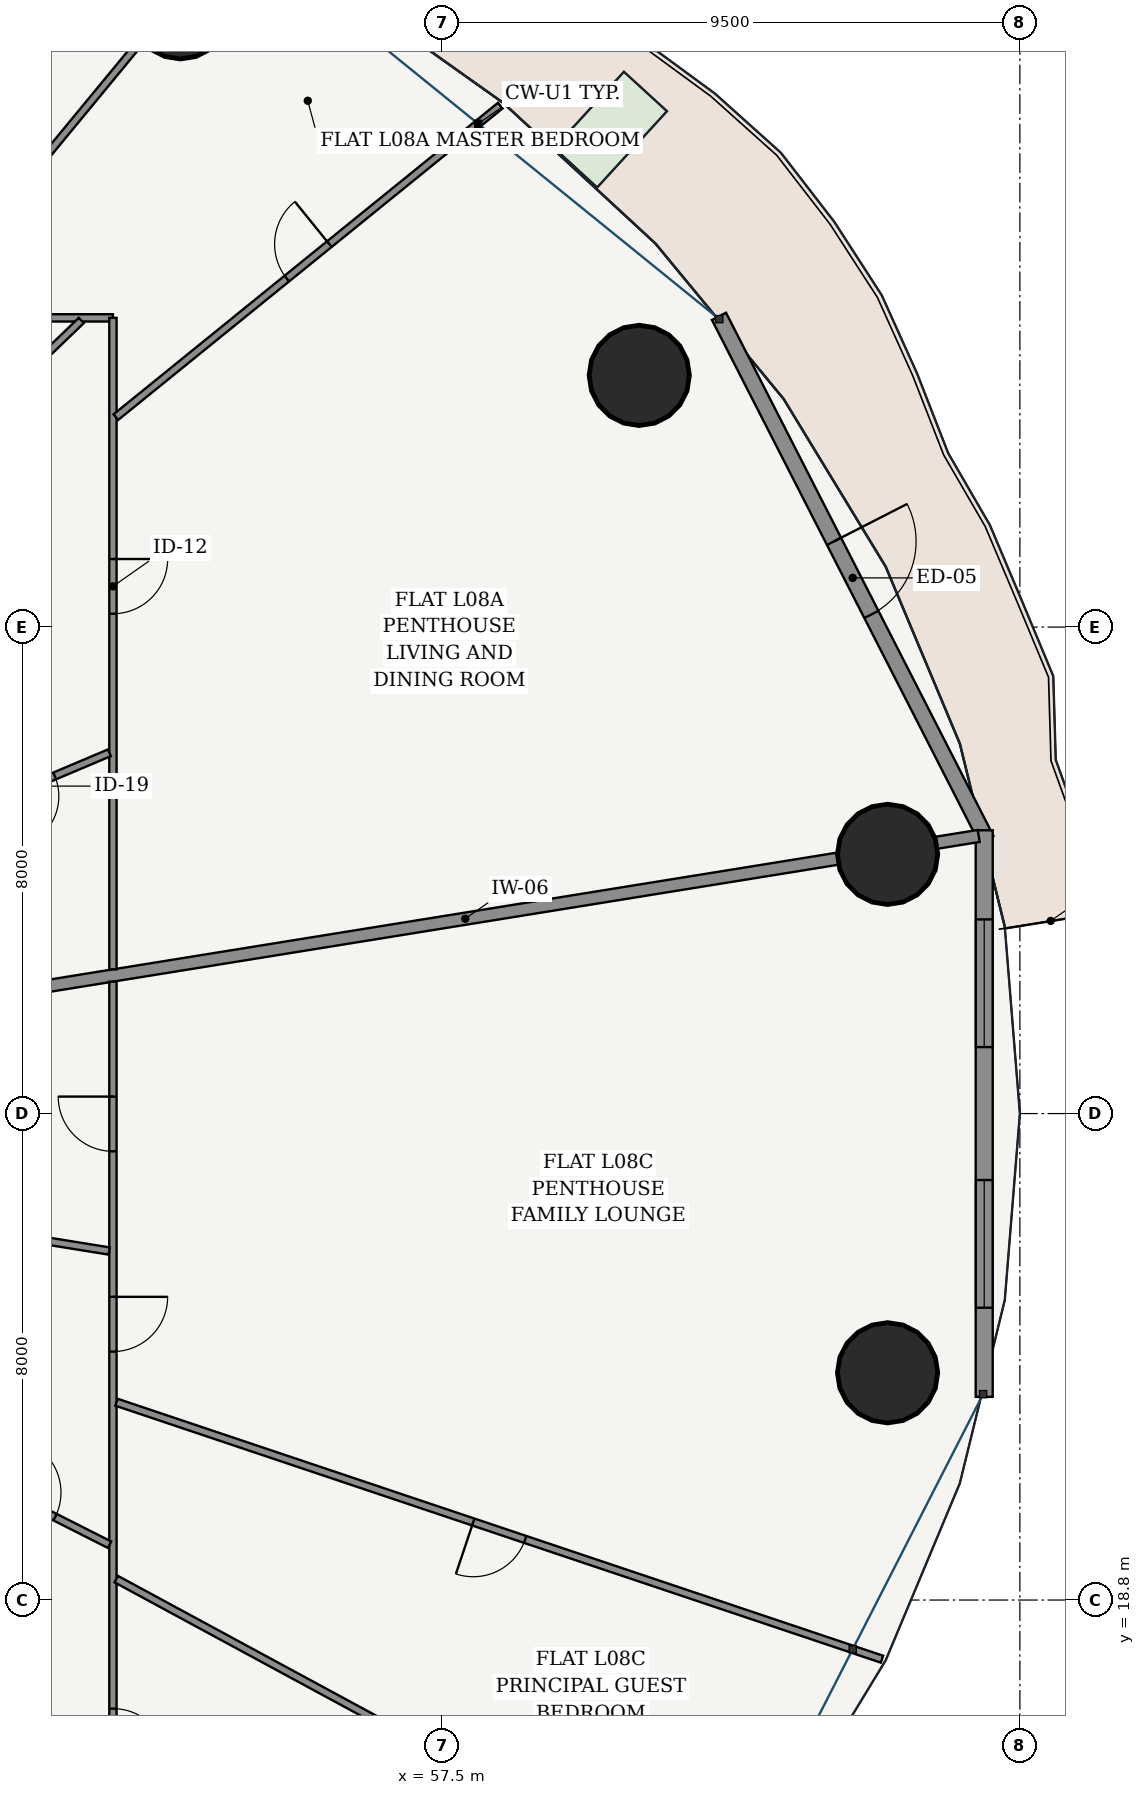
"""IFC4 building model, lengths in metres.
Left out: names, types, materials, properties, quantities, classifications, styles, units other than length and angle.
Written with IfcOpenShell. Run it as: python <this file> out.ifc"""

import sys

from ifc_helpers import new_model, si_unit, direction, frame, frame_2d, origin, origin_2d, place, context, subcontext, project, spatial, rectangle, hollow_circle, extrude, source, transform, mapped, element, fill, save


model = new_model("IFC4")
c1 = context("Model", 3, precision=1e-05, world=origin(), true_north=direction((-0.2419218956, 0.970295726276)))
c2 = subcontext(c1, "Body", "Model", "MODEL_VIEW")
j1 = project(units=[si_unit("LENGTHUNIT", "METRE"), si_unit("PLANEANGLEUNIT", "RADIAN")], contexts=[c1])
p1 = place(None, origin())
s1 = spatial("IfcSite", under=j1, at=p1, CompositionType="ELEMENT")
p2 = place(p1, origin())
s2 = spatial("IfcBuilding", under=s1, at=p2, CompositionType="ELEMENT")
p3 = place(p2, frame((0.0, 0.0, 34.8)))
s3 = spatial("IfcBuildingStorey", under=s2, at=p3, CompositionType="ELEMENT", Elevation=34.8)
for number, where, z_axis, x_axis in (
    (1, (64.824, 31.063, 0.0), (0.0, 0.0, 1.0), (1.0, 0.0, 0.0)),
    (2, (60.741, 38.939, 0.0), (0.0, 0.0, 1.0), (1.0, 0.0, 0.0)),
    (3, (53.195, 44.968, 0.0), (0.0, 0.0, 1.0), (1.0, 0.0, 0.0)),
    (4, (64.824, 22.537, 0.0), (0.0, 0.0, 1.0), (1.0, 0.0, 0.0)),
):
    element("IfcColumn", number, at=place(p3, frame(where, z_axis=z_axis, x_axis=x_axis)), inside=s3, PredefinedType="COLUMN", context=c2, shape_type="SweptSolid", body=[
        extrude(hollow_circle(Radius=0.825, WallThickness=0.05, at=origin_2d()), origin(), (0.0, 0.0, 1.0), 3.6),
    ])
p4 = place(p3, frame((66.45, 31.308, 0.0), z_axis=(0.0, 0.0, 1.0), x_axis=(-0.45523081716, 0.890373462715, 0.0)))
e5 = element("IfcWall", 5, at=p4, inside=s3, PredefinedType="SOLIDWALL", context=c2, shape_type="SweptSolid", body=[
    extrude(rectangle(XDim=9.662, YDim=0.26, at=frame_2d((4.831, 0.0))), origin(), (0.0, 0.0, 1.0), 3.32),
])
p5 = place(p4, frame((4.156, 0.0, 0.0)))
e6 = element("IfcOpeningElement", 6, at=p5, cuts=e5, PredefinedType="OPENING", context=c2, shape_type="SweptSolid", body=[
    extrude(rectangle(XDim=1.35, YDim=2.2, at=frame_2d((0.675, 1.1))), frame((0.0, 0.14, 0.0), z_axis=(0.0, -1.0, 0.0), x_axis=(1.0, 0.0, 0.0)), (0.0, 0.0, 1.0), 0.28),
])
p6 = place(p3, frame((66.413, 22.141, 0.0), z_axis=(0.0, 0.0, 1.0), x_axis=(0.0, 1.0, 0.0)))
e7 = element("IfcWall", 7, at=p6, inside=s3, PredefinedType="SOLIDWALL", context=c2, shape_type="SweptSolid", body=[
    extrude(rectangle(XDim=9.318, YDim=0.28, at=frame_2d((4.659, 0.0))), origin(), (0.0, 0.0, 1.0), 3.32),
])
p7 = place(p6, frame((1.466, 0.0, 0.85)))
e8 = element("IfcOpeningElement", 8, at=p7, cuts=e7, PredefinedType="OPENING", context=c2, shape_type="SweptSolid", body=[
    extrude(rectangle(XDim=2.1, YDim=1.95, at=frame_2d((1.05, 0.975))), frame((0.0, 0.15, 0.0), z_axis=(0.0, -1.0, 0.0), x_axis=(1.0, 0.0, 0.0)), (0.0, 0.0, 1.0), 0.3),
])
p8 = place(p6, frame((5.752, 0.0, 0.85)))
e9 = element("IfcOpeningElement", 9, at=p8, cuts=e7, PredefinedType="OPENING", context=c2, shape_type="SweptSolid", body=[
    extrude(rectangle(XDim=2.1, YDim=1.95, at=frame_2d((1.05, 0.975))), frame((0.0, 0.15, 0.0), z_axis=(0.0, -1.0, 0.0), x_axis=(1.0, 0.0, 0.0)), (0.0, 0.0, 1.0), 0.3),
])
p9 = place(p3, frame((49.435, 28.643, 0.0), z_axis=(0.0, 0.0, 1.0), x_axis=(0.987255953651, 0.159140447344, 0.0)))
e10 = element("IfcWall", 10, at=p9, inside=s3, PredefinedType="PARTITIONING", context=c2, shape_type="SweptSolid", body=[
    extrude(rectangle(XDim=17.105, YDim=0.2, at=frame_2d((8.553, 0.0))), origin(), (0.0, 0.0, 1.0), 2.688),
])
p10 = place(p3, frame((27.312, 39.885, 0.0), z_axis=(0.0, 0.0, 1.0), x_axis=(1.0, 0.0, 0.0)))
e11 = element("IfcWall", 11, at=p10, inside=s3, PredefinedType="PARTITIONING", context=c2, shape_type="SweptSolid", body=[
    extrude(rectangle(XDim=24.772, YDim=0.12, at=frame_2d((12.386, 0.0))), origin(), (0.0, 0.0, 1.0), 2.688),
])
p11 = place(p3, frame((52.085, 39.885, 0.0), z_axis=(0.0, 0.0, 1.0), x_axis=(0.0, -1.0, 0.0)))
e12 = element("IfcWall", 12, at=p11, inside=s3, PredefinedType="PARTITIONING", context=c2, shape_type="SweptSolid", body=[
    extrude(rectangle(XDim=10.713, YDim=0.12, at=frame_2d((5.356, 0.0))), origin(), (0.0, 0.0, 1.0), 2.688),
])
p12 = place(p11, frame((3.965, 0.0, 0.0)))
e13 = element("IfcOpeningElement", 13, at=p12, cuts=e12, PredefinedType="OPENING", context=c2, shape_type="SweptSolid", body=[
    extrude(rectangle(XDim=0.9, YDim=2.15, at=frame_2d((0.45, 1.075))), frame((0.0, 0.07, 0.0), z_axis=(0.0, -1.0, 0.0), x_axis=(1.0, 0.0, 0.0)), (0.0, 0.0, 1.0), 0.14),
])
p13 = place(p3, frame((52.133, 38.253, 0.0), z_axis=(0.0, 0.0, 1.0), x_axis=(0.776936623447, 0.629578814087, 0.0)))
e14 = element("IfcWall", 14, at=p13, inside=s3, PredefinedType="PARTITIONING", context=c2, shape_type="SweptSolid", body=[
    extrude(rectangle(XDim=8.136, YDim=0.12, at=frame_2d((4.068, 0.0))), origin(), (0.0, 0.0, 1.0), 2.762),
])
p14 = place(p13, frame((3.618, 0.0, 0.0)))
e15 = element("IfcOpeningElement", 15, at=p14, cuts=e14, PredefinedType="OPENING", context=c2, shape_type="SweptSolid", body=[
    extrude(rectangle(XDim=0.9, YDim=2.15, at=frame_2d((0.45, 1.075))), frame((0.0, 0.07, 0.0), z_axis=(0.0, -1.0, 0.0), x_axis=(1.0, 0.0, 0.0)), (0.0, 0.0, 1.0), 0.14),
])
p15 = place(p3, frame((48.829, 39.933, 0.0), z_axis=(0.0, 0.0, 1.0), x_axis=(0.636192172227, 0.771530634516, 0.0)))
e16 = element("IfcWall", 16, at=p15, inside=s3, PredefinedType="PARTITIONING", context=c2, shape_type="SweptSolid", body=[
    extrude(rectangle(XDim=8.186, YDim=0.12, at=frame_2d((4.093, 0.0))), origin(), (0.0, 0.0, 1.0), 2.688),
])
p16 = place(p15, frame((2.584, 0.0, 0.0)))
e17 = element("IfcOpeningElement", 17, at=p16, cuts=e16, PredefinedType="OPENING", context=c2, shape_type="SweptSolid", body=[
    extrude(rectangle(XDim=0.9, YDim=2.15, at=frame_2d((0.45, 1.075))), frame((0.0, 0.07, 0.0), z_axis=(0.0, -1.0, 0.0), x_axis=(1.0, 0.0, 0.0)), (0.0, 0.0, 1.0), 0.14),
])
p17 = place(p3, frame((49.435, 31.636, 0.0), z_axis=(0.0, 0.0, 1.0), x_axis=(0.920969644836, 0.389634332792, 0.0)))
e18 = element("IfcWall", 18, at=p17, inside=s3, PredefinedType="PARTITIONING", context=c2, shape_type="SweptSolid", body=[
    extrude(rectangle(XDim=2.815, YDim=0.12, at=frame_2d((1.408, 0.0))), origin(), (0.0, 0.0, 1.0), 3.32),
])
p18 = place(p17, frame((0.978, 0.0, 0.0)))
e19 = element("IfcOpeningElement", 19, at=p18, cuts=e18, PredefinedType="OPENING", context=c2, shape_type="SweptSolid", body=[
    extrude(rectangle(XDim=0.86, YDim=2.15, at=frame_2d((0.43, 1.075))), frame((0.0, 0.07, 0.0), z_axis=(0.0, -1.0, 0.0), x_axis=(1.0, 0.0, 0.0)), (0.0, 0.0, 1.0), 0.14),
])
p19 = place(p3, frame((48.855, 37.236, 0.0), z_axis=(0.0, 0.0, 1.0), x_axis=(0.720835560675, 0.693106120638, 0.0)))
e20 = element("IfcWall", 20, at=p19, inside=s3, PredefinedType="PARTITIONING", context=c2, shape_type="SweptSolid", body=[
    extrude(rectangle(XDim=3.76, YDim=0.12, at=frame_2d((1.88, 0.0))), origin(), (0.0, 0.0, 1.0), 2.999),
])
p20 = place(p19, frame((1.43, 0.0, 0.0)))
e21 = element("IfcOpeningElement", 21, at=p20, cuts=e20, PredefinedType="OPENING", context=c2, shape_type="SweptSolid", body=[
    extrude(rectangle(XDim=0.9, YDim=2.15, at=frame_2d((0.45, 1.075))), frame((0.0, 0.07, 0.0), z_axis=(0.0, -1.0, 0.0), x_axis=(1.0, 0.0, 0.0)), (0.0, 0.0, 1.0), 0.14),
])
p21 = place(p3, frame((52.085, 28.968, 0.0), z_axis=(0.0, 0.0, 1.0), x_axis=(0.0, -1.0, 0.0)))
e22 = element("IfcWall", 22, at=p21, inside=s3, PredefinedType="PARTITIONING", context=c2, shape_type="SweptSolid", body=[
    extrude(rectangle(XDim=15.253, YDim=0.12, at=frame_2d((7.626, 0.0))), origin(), (0.0, 0.0, 1.0), 2.688),
])
p22 = place(p21, frame((11.954, 0.0, 0.0)))
e23 = element("IfcOpeningElement", 23, at=p22, cuts=e22, PredefinedType="OPENING", context=c2, shape_type="SweptSolid", body=[
    extrude(rectangle(XDim=0.9, YDim=2.15, at=frame_2d((0.45, 1.075))), frame((0.0, 0.07, 0.0), z_axis=(0.0, -1.0, 0.0), x_axis=(1.0, 0.0, 0.0)), (0.0, 0.0, 1.0), 0.14),
])
p23 = place(p21, frame((5.182, 0.0, 0.0)))
e24 = element("IfcOpeningElement", 24, at=p23, cuts=e22, PredefinedType="OPENING", context=c2, shape_type="SweptSolid", body=[
    extrude(rectangle(XDim=0.9, YDim=2.15, at=frame_2d((0.45, 1.075))), frame((0.0, 0.07, 0.0), z_axis=(0.0, -1.0, 0.0), x_axis=(1.0, 0.0, 0.0)), (0.0, 0.0, 1.0), 0.14),
])
p24 = place(p21, frame((1.889, 0.0, 0.0)))
e25 = element("IfcOpeningElement", 25, at=p24, cuts=e22, PredefinedType="OPENING", context=c2, shape_type="SweptSolid", body=[
    extrude(rectangle(XDim=0.9, YDim=2.15, at=frame_2d((0.45, 1.075))), frame((0.0, 0.07, 0.0), z_axis=(0.0, -1.0, 0.0), x_axis=(1.0, 0.0, 0.0)), (0.0, 0.0, 1.0), 0.14),
])
p25 = place(p3, frame((52.139, 19.144, 0.0), z_axis=(0.0, 0.0, 1.0), x_axis=(0.879372452045, -0.476134529922, 0.0)))
e26 = element("IfcWall", 26, at=p25, inside=s3, PredefinedType="PARTITIONING", context=c2, shape_type="SweptSolid", body=[
    extrude(rectangle(XDim=11.219, YDim=0.12, at=frame_2d((5.61, 0.0))), origin(), (0.0, 0.0, 1.0), 2.688),
])
p26 = place(p3, frame((52.144, 22.052, 0.0), z_axis=(0.0, 0.0, 1.0), x_axis=(0.948023034133, -0.318201707653, 0.0)))
e27 = element("IfcWall", 27, at=p26, inside=s3, PredefinedType="PARTITIONING", context=c2, shape_type="SweptSolid", body=[
    extrude(rectangle(XDim=13.279, YDim=0.12, at=frame_2d((6.639, 0.0))), origin(), (0.0, 0.0, 1.0), 2.762),
])
p27 = place(p26, frame((6.189, 0.0, 0.0)))
e28 = element("IfcOpeningElement", 28, at=p27, cuts=e27, PredefinedType="OPENING", context=c2, shape_type="SweptSolid", body=[
    extrude(rectangle(XDim=0.9, YDim=2.15, at=frame_2d((0.45, 1.075))), frame((0.0, 0.07, 0.0), z_axis=(0.0, -1.0, 0.0), x_axis=(1.0, 0.0, 0.0)), (0.0, 0.0, 1.0), 0.14),
])
p28 = place(p3, frame((49.435, 21.021, 0.0), z_axis=(0.0, 0.0, 1.0), x_axis=(0.892504324967, -0.451038834155, 0.0)))
e29 = element("IfcWall", 29, at=p28, inside=s3, PredefinedType="PARTITIONING", context=c2, shape_type="SweptSolid", body=[
    extrude(rectangle(XDim=2.907, YDim=0.12, at=frame_2d((1.454, 0.0))), origin(), (0.0, 0.0, 1.0), 3.32),
])
p29 = place(p28, frame((1.004, 0.0, 0.0)))
e30 = element("IfcOpeningElement", 30, at=p29, cuts=e29, PredefinedType="OPENING", context=c2, shape_type="SweptSolid", body=[
    extrude(rectangle(XDim=0.9, YDim=2.15, at=frame_2d((0.45, 1.075))), frame((0.0, 0.07, 0.0), z_axis=(0.0, -1.0, 0.0), x_axis=(1.0, 0.0, 0.0)), (0.0, 0.0, 1.0), 0.14),
])
p30 = place(p3, frame((49.435, 24.957, 0.0), z_axis=(0.0, 0.0, 1.0), x_axis=(0.987258113076, -0.159127050386, 0.0)))
e31 = element("IfcWall", 31, at=p30, inside=s3, PredefinedType="PARTITIONING", context=c2, shape_type="SweptSolid", body=[
    extrude(rectangle(XDim=2.622, YDim=0.12, at=frame_2d((1.311, 0.0))), origin(), (0.0, 0.0, 1.0), 2.688),
])
m1 = source(origin(), c2, "Body", "SweptSolid", [
    extrude(rectangle(XDim=1.35, YDim=2.2, at=frame_2d((0.675, 1.1))), frame((0.0, 0.025, 0.0), z_axis=(0.0, -1.0, 0.0), x_axis=(1.0, 0.0, 0.0)), (0.0, 0.0, 1.0), 0.05),
])
p31 = place(p5, frame((1.35, 0.0, 0.0), z_axis=(0.0, 0.0, 1.0), x_axis=(-1.0, 0.0, 0.0)))
e32 = element("IfcDoor", 32, at=p31, inside=s3, OperationType="SINGLE_SWING_LEFT", PredefinedType="DOOR", context=c2, shape_type="MappedRepresentation", body=[
    mapped(m1, transform((0.0, 0.0, 0.0), scale=1.0)),
])
fill(e6, e32)
m2 = source(origin(), c2, "Body", "SweptSolid", [
    extrude(rectangle(XDim=2.1, YDim=1.95, at=frame_2d((1.05, 0.975))), frame((0.0, 0.03, 0.0), z_axis=(0.0, -1.0, 0.0), x_axis=(1.0, 0.0, 0.0)), (0.0, 0.0, 1.0), 0.06),
])
p32 = place(p7, origin())
e33 = element("IfcWindow", 33, at=p32, inside=s3, PartitioningType="SINGLE_PANEL", PredefinedType="WINDOW", context=c2, shape_type="MappedRepresentation", body=[
    mapped(m2, transform((0.0, 0.0, 0.0), scale=1.0)),
])
fill(e8, e33)
p33 = place(p8, origin())
e34 = element("IfcWindow", 34, at=p33, inside=s3, PartitioningType="SINGLE_PANEL", PredefinedType="WINDOW", context=c2, shape_type="MappedRepresentation", body=[
    mapped(m2, transform((0.0, 0.0, 0.0), scale=1.0)),
])
fill(e9, e34)
m3 = source(origin(), c2, "Body", "SweptSolid", [
    extrude(rectangle(XDim=0.86, YDim=2.15, at=frame_2d((0.43, 1.075))), frame((0.0, 0.025, 0.0), z_axis=(0.0, -1.0, 0.0), x_axis=(1.0, 0.0, 0.0)), (0.0, 0.0, 1.0), 0.05),
])
p34 = place(p18, frame((0.86, 0.0, 0.0), z_axis=(0.0, 0.0, 1.0), x_axis=(-1.0, 0.0, 0.0)))
e35 = element("IfcDoor", 35, at=p34, inside=s3, OperationType="SINGLE_SWING_RIGHT", PredefinedType="DOOR", context=c2, shape_type="MappedRepresentation", body=[
    mapped(m3, transform((0.0, 0.0, 0.0), scale=1.0)),
])
fill(e19, e35)
m4 = source(origin(), c2, "Body", "SweptSolid", [
    extrude(rectangle(XDim=0.9, YDim=2.15, at=frame_2d((0.45, 1.075))), frame((0.0, 0.025, 0.0), z_axis=(0.0, -1.0, 0.0), x_axis=(1.0, 0.0, 0.0)), (0.0, 0.0, 1.0), 0.05),
])
p35 = place(p12, origin())
e36 = element("IfcDoor", 36, at=p35, inside=s3, OperationType="SINGLE_SWING_LEFT", PredefinedType="DOOR", context=c2, shape_type="MappedRepresentation", body=[
    mapped(m4, transform((0.0, 0.0, 0.0), scale=1.0)),
])
fill(e13, e36)
p36 = place(p14, origin())
e37 = element("IfcDoor", 37, at=p36, inside=s3, OperationType="SINGLE_SWING_RIGHT", PredefinedType="DOOR", context=c2, shape_type="MappedRepresentation", body=[
    mapped(m4, transform((0.0, 0.0, 0.0), scale=1.0)),
])
fill(e15, e37)
p37 = place(p29, origin())
e38 = element("IfcDoor", 38, at=p37, inside=s3, OperationType="SINGLE_SWING_LEFT", PredefinedType="DOOR", context=c2, shape_type="MappedRepresentation", body=[
    mapped(m4, transform((0.0, 0.0, 0.0), scale=1.0)),
])
fill(e30, e38)
p38 = place(p22, origin())
e39 = element("IfcDoor", 39, at=p38, inside=s3, OperationType="SINGLE_SWING_RIGHT", PredefinedType="DOOR", context=c2, shape_type="MappedRepresentation", body=[
    mapped(m4, transform((0.0, 0.0, 0.0), scale=1.0)),
])
fill(e23, e39)
p39 = place(p23, origin())
e40 = element("IfcDoor", 40, at=p39, inside=s3, OperationType="SINGLE_SWING_LEFT", PredefinedType="DOOR", context=c2, shape_type="MappedRepresentation", body=[
    mapped(m4, transform((0.0, 0.0, 0.0), scale=1.0)),
])
fill(e24, e40)
p40 = place(p24, frame((0.9, 0.0, 0.0), z_axis=(0.0, 0.0, 1.0), x_axis=(-1.0, 0.0, 0.0)))
e41 = element("IfcDoor", 41, at=p40, inside=s3, OperationType="SINGLE_SWING_RIGHT", PredefinedType="DOOR", context=c2, shape_type="MappedRepresentation", body=[
    mapped(m4, transform((0.0, 0.0, 0.0), scale=1.0)),
])
fill(e25, e41)
p41 = place(p27, frame((0.9, 0.0, 0.0), z_axis=(0.0, 0.0, 1.0), x_axis=(-1.0, 0.0, 0.0)))
e42 = element("IfcDoor", 42, at=p41, inside=s3, OperationType="SINGLE_SWING_RIGHT", PredefinedType="DOOR", context=c2, shape_type="MappedRepresentation", body=[
    mapped(m4, transform((0.0, 0.0, 0.0), scale=1.0)),
])
fill(e28, e42)
save(model, sys.argv[1])
